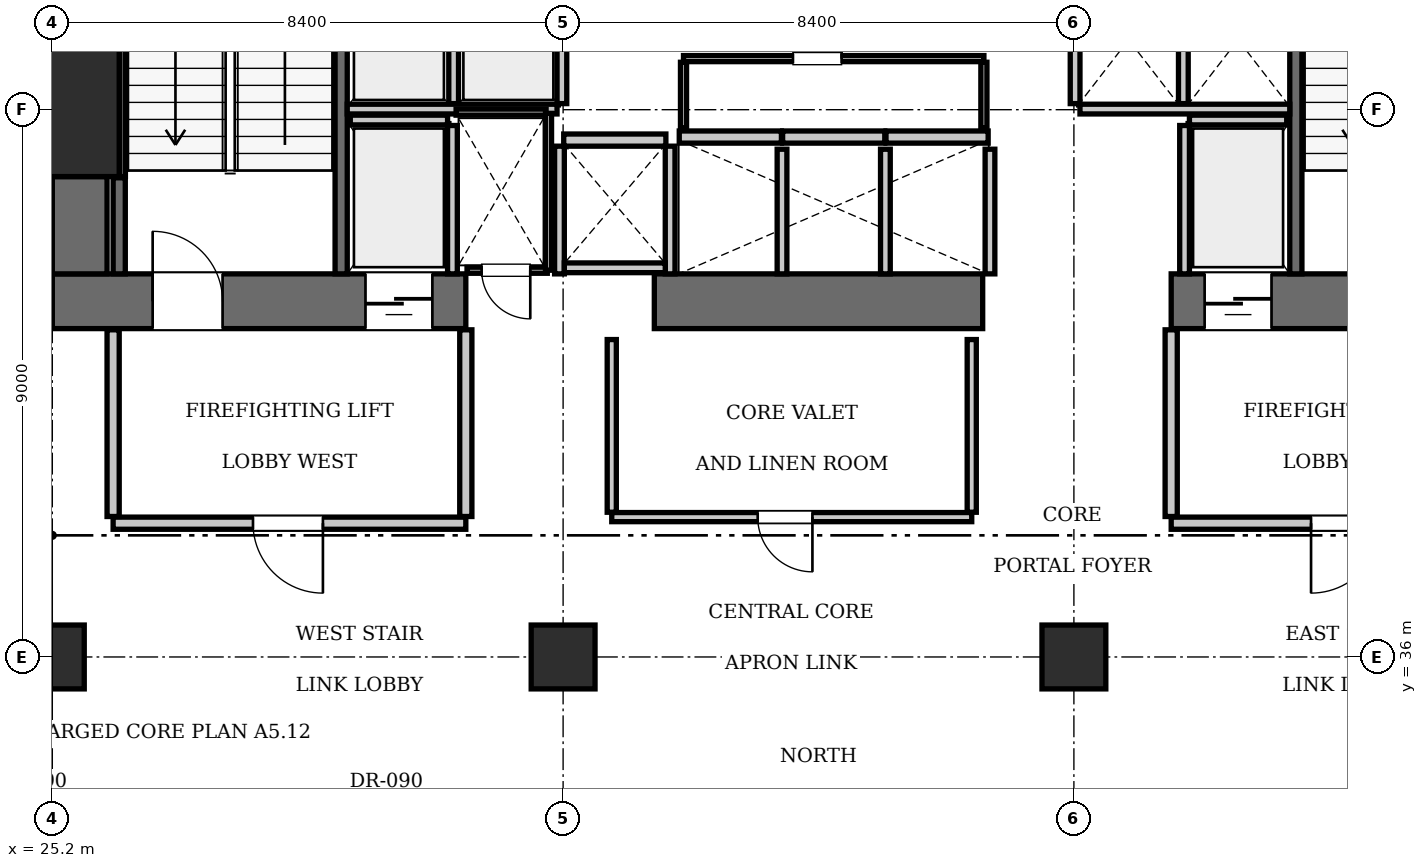
"""IFC4 building model, lengths in metres.
Left out: names, types, materials, properties, quantities, classifications, styles, units other than length and angle.
Written with IfcOpenShell. Run it as: python <this file> out.ifc"""

import sys

from ifc_helpers import new_model, si_unit, direction, frame, frame_2d, origin, origin_2d, place, context, subcontext, project, spatial, rectangle, extrude, element, fill, save


model = new_model("IFC4")
c1 = context("Model", 3, precision=1e-05, world=origin(), true_north=direction((0.0, 1.0)))
c2 = subcontext(c1, "Body", "Model", "MODEL_VIEW")
j1 = project(units=[si_unit("LENGTHUNIT", "METRE"), si_unit("PLANEANGLEUNIT", "RADIAN")], contexts=[c1])
p1 = place(None, origin())
s1 = spatial("IfcSite", under=j1, at=p1, CompositionType="ELEMENT")
p2 = place(p1, origin())
s2 = spatial("IfcBuilding", under=s1, at=p2, CompositionType="ELEMENT")
p3 = place(p2, frame((0.0, 0.0, 65.45)))
s3 = spatial("IfcBuildingStorey", under=s2, at=p3, CompositionType="ELEMENT", Elevation=65.45)
p4 = place(p3, frame((25.2, 45.0, 0.0), z_axis=(0.0, 0.0, 1.0), x_axis=(1.0, 0.0, 0.0)))
e1 = element("IfcColumn", 1, at=p4, inside=s3, PredefinedType="COLUMN", context=c2, shape_type="SweptSolid", body=[
    extrude(rectangle(XDim=2.2, YDim=2.2, at=origin_2d()), origin(), (0.0, 0.0, 1.0), 3.85),
])
p5 = place(p3, frame((25.2, 41.85, 0.0), z_axis=(0.0, 0.0, 1.0), x_axis=(1.0, 0.0, 0.0)))
e2 = element("IfcWall", 2, at=p5, inside=s3, PredefinedType="SHEAR", context=c2, shape_type="SweptSolid", body=[
    extrude(rectangle(XDim=6.8, YDim=0.9, at=frame_2d((3.4, 0.0))), origin(), (0.0, 0.0, 1.0), 3.85),
])
p6 = place(p5, frame((1.65, 0.0, 0.0)))
e3 = element("IfcOpeningElement", 3, at=p6, cuts=e2, PredefinedType="OPENING", context=c2, shape_type="SweptSolid", body=[
    extrude(rectangle(XDim=1.15, YDim=2.15, at=frame_2d((0.575, 1.075))), frame((0.0, 0.46, 0.0), z_axis=(0.0, -1.0, 0.0), x_axis=(1.0, 0.0, 0.0)), (0.0, 0.0, 1.0), 0.92),
])
p7 = place(p5, frame((5.15, 0.0, 0.0)))
e4 = element("IfcOpeningElement", 4, at=p7, cuts=e2, PredefinedType="OPENING", context=c2, shape_type="SweptSolid", body=[
    extrude(rectangle(XDim=1.1, YDim=2.2, at=frame_2d((0.55, 1.1))), frame((0.0, 0.46, 0.0), z_axis=(0.0, -1.0, 0.0), x_axis=(1.0, 0.0, 0.0)), (0.0, 0.0, 1.0), 0.92),
])
p8 = place(p3, frame((35.1, 41.85, 0.0), z_axis=(0.0, 0.0, 1.0), x_axis=(1.0, 0.0, 0.0)))
e5 = element("IfcWall", 5, at=p8, inside=s3, PredefinedType="SHEAR", context=c2, shape_type="SweptSolid", body=[
    extrude(rectangle(XDim=5.4, YDim=0.9, at=frame_2d((2.7, 0.0))), origin(), (0.0, 0.0, 1.0), 3.85),
])
p9 = place(p3, frame((43.6, 41.85, 0.0), z_axis=(0.0, 0.0, 1.0), x_axis=(1.0, 0.0, 0.0)))
e6 = element("IfcWall", 6, at=p9, inside=s3, PredefinedType="SHEAR", context=c2, shape_type="SweptSolid", body=[
    extrude(rectangle(XDim=6.8, YDim=0.9, at=frame_2d((3.4, 0.0))), origin(), (0.0, 0.0, 1.0), 3.85),
])
p10 = place(p9, frame((3.9, 0.0, 0.0)))
e7 = element("IfcOpeningElement", 7, at=p10, cuts=e6, PredefinedType="OPENING", context=c2, shape_type="SweptSolid", body=[
    extrude(rectangle(XDim=1.15, YDim=2.15, at=frame_2d((0.575, 1.075))), frame((0.0, 0.46, 0.0), z_axis=(0.0, -1.0, 0.0), x_axis=(1.0, 0.0, 0.0)), (0.0, 0.0, 1.0), 0.92),
])
p11 = place(p9, frame((0.55, 0.0, 0.0)))
e8 = element("IfcOpeningElement", 8, at=p11, cuts=e6, PredefinedType="OPENING", context=c2, shape_type="SweptSolid", body=[
    extrude(rectangle(XDim=1.1, YDim=2.2, at=frame_2d((0.55, 1.1))), frame((0.0, 0.46, 0.0), z_axis=(0.0, -1.0, 0.0), x_axis=(1.0, 0.0, 0.0)), (0.0, 0.0, 1.0), 0.92),
])
p12 = place(p3, frame((25.65, 42.3, 0.0), z_axis=(0.0, 0.0, 1.0), x_axis=(0.0, 1.0, 0.0)))
e9 = element("IfcWall", 9, at=p12, inside=s3, PredefinedType="SHEAR", context=c2, shape_type="SweptSolid", body=[
    extrude(rectangle(XDim=1.6, YDim=0.9, at=frame_2d((0.8, 0.0))), origin(), (0.0, 0.0, 1.0), 3.85),
])
for number, where, z_axis, x_axis in (
    (10, (25.2, 36.0, 0.0), (0.0, 0.0, 1.0), (1.0, 0.0, 0.0)),
    (11, (33.6, 36.0, 0.0), (0.0, 0.0, 1.0), (1.0, 0.0, 0.0)),
    (12, (42.0, 36.0, 0.0), (0.0, 0.0, 1.0), (1.0, 0.0, 0.0)),
):
    element("IfcColumn", number, at=place(p3, frame(where, z_axis=z_axis, x_axis=x_axis)), inside=s3, PredefinedType="COLUMN", context=c2, shape_type="SweptSolid", body=[
        extrude(rectangle(XDim=1.05, YDim=1.05, at=origin_2d()), origin(), (0.0, 0.0, 1.0), 3.85),
    ])
p13 = place(p3, frame((29.95, 42.3, 0.0), z_axis=(0.0, 0.0, 1.0), x_axis=(0.0, 1.0, 0.0)))
e13 = element("IfcWall", 13, at=p13, inside=s3, PredefinedType="SOLIDWALL", context=c2, shape_type="SweptSolid", body=[
    extrude(rectangle(XDim=8.85, YDim=0.2, at=frame_2d((4.425, 0.0))), origin(), (0.0, 0.0, 1.0), 3.61),
])
p14 = place(p3, frame((26.3, 42.3, 0.0), z_axis=(0.0, 0.0, 1.0), x_axis=(0.0, 1.0, 0.0)))
e14 = element("IfcWall", 14, at=p14, inside=s3, PredefinedType="SOLIDWALL", context=c2, shape_type="SweptSolid", body=[
    extrude(rectangle(XDim=1.58, YDim=0.2, at=frame_2d((0.79, 0.0))), origin(), (0.0, 0.0, 1.0), 3.61),
])
p15 = place(p3, frame((26.352, 43.9, 0.0), z_axis=(0.0, 0.0, 1.0), x_axis=(0.0, 1.0, 0.0)))
e15 = element("IfcWall", 15, at=p15, inside=s3, PredefinedType="SOLIDWALL", context=c2, shape_type="SweptSolid", body=[
    extrude(rectangle(XDim=2.2, YDim=0.1, at=frame_2d((1.1, 0.0))), origin(), (0.0, 0.0, 1.0), 3.61),
])
p16 = place(p3, frame((45.65, 42.3, 0.0), z_axis=(0.0, 0.0, 1.0), x_axis=(0.0, 1.0, 0.0)))
e16 = element("IfcWall", 16, at=p16, inside=s3, PredefinedType="SOLIDWALL", context=c2, shape_type="SweptSolid", body=[
    extrude(rectangle(XDim=8.85, YDim=0.2, at=frame_2d((4.425, 0.0))), origin(), (0.0, 0.0, 1.0), 3.61),
])
for number, where, z_axis, x_axis in (
    (17, (35.51, 44.55, 0.0), (0.0, 0.0, 1.0), (1.0, 0.0, 0.0)),
    (18, (37.21, 44.55, 0.0), (0.0, 0.0, 1.0), (1.0, 0.0, 0.0)),
):
    element("IfcWall", number, at=place(p3, frame(where, z_axis=z_axis, x_axis=x_axis)), inside=s3, PredefinedType="SOLIDWALL", context=c2, shape_type="SweptSolid", body=[
        extrude(rectangle(XDim=1.68, YDim=0.2, at=frame_2d((0.84, 0.0))), origin(), (0.0, 0.0, 1.0), 3.61),
    ])
p17 = place(p3, frame((38.91, 44.55, 0.0), z_axis=(0.0, 0.0, 1.0), x_axis=(1.0, 0.0, 0.0)))
e19 = element("IfcWall", 19, at=p17, inside=s3, PredefinedType="SOLIDWALL", context=c2, shape_type="SweptSolid", body=[
    extrude(rectangle(XDim=1.68, YDim=0.2, at=frame_2d((0.84, 0.0))), origin(), (0.0, 0.0, 1.0), 3.61),
])
p18 = place(p3, frame((33.61, 44.5, 0.0), z_axis=(0.0, 0.0, 1.0), x_axis=(1.0, 0.0, 0.0)))
e20 = element("IfcWall", 20, at=p18, inside=s3, PredefinedType="SOLIDWALL", context=c2, shape_type="SweptSolid", body=[
    extrude(rectangle(XDim=1.68, YDim=0.2, at=frame_2d((0.84, 0.0))), origin(), (0.0, 0.0, 1.0), 3.61),
])
p19 = place(p3, frame((30.1, 44.83, 0.0), z_axis=(0.0, 0.0, 1.0), x_axis=(1.0, 0.0, 0.0)))
e21 = element("IfcWall", 21, at=p19, inside=s3, PredefinedType="SOLIDWALL", context=c2, shape_type="SweptSolid", body=[
    extrude(rectangle(XDim=1.6, YDim=0.16, at=frame_2d((0.8, 0.0))), origin(), (0.0, 0.0, 1.0), 3.61),
])
p20 = place(p3, frame((31.78, 42.3, 0.0), z_axis=(0.0, 0.0, 1.0), x_axis=(0.0, 1.0, 0.0)))
e22 = element("IfcWall", 22, at=p20, inside=s3, PredefinedType="SOLIDWALL", context=c2, shape_type="SweptSolid", body=[
    extrude(rectangle(XDim=2.44, YDim=0.16, at=frame_2d((1.22, 0.0))), origin(), (0.0, 0.0, 1.0), 3.61),
])
p21 = place(p3, frame((43.9, 44.83, 0.0), z_axis=(0.0, 0.0, 1.0), x_axis=(1.0, 0.0, 0.0)))
e23 = element("IfcWall", 23, at=p21, inside=s3, PredefinedType="SOLIDWALL", context=c2, shape_type="SweptSolid", body=[
    extrude(rectangle(XDim=1.6, YDim=0.16, at=frame_2d((0.8, 0.0))), origin(), (0.0, 0.0, 1.0), 3.61),
])
p22 = place(p3, frame((43.82, 42.3, 0.0), z_axis=(0.0, 0.0, 1.0), x_axis=(0.0, 1.0, 0.0)))
e24 = element("IfcWall", 24, at=p22, inside=s3, PredefinedType="SOLIDWALL", context=c2, shape_type="SweptSolid", body=[
    extrude(rectangle(XDim=2.44, YDim=0.16, at=frame_2d((1.22, 0.0))), origin(), (0.0, 0.0, 1.0), 3.61),
])
for number, where, z_axis, x_axis in (
    (25, (31.8, 45.1, 0.0), (0.0, 0.0, 1.0), (0.0, 1.0, 0.0)),
    (26, (33.58, 45.1, 0.0), (0.0, 0.0, 1.0), (0.0, 1.0, 0.0)),
):
    element("IfcWall", number, at=place(p3, frame(where, z_axis=z_axis, x_axis=x_axis)), inside=s3, PredefinedType="SOLIDWALL", context=c2, shape_type="SweptSolid", body=[
        extrude(rectangle(XDim=1.95, YDim=0.16, at=frame_2d((0.975, 0.0))), origin(), (0.0, 0.0, 1.0), 3.61),
    ])
p23 = place(p3, frame((30.05, 45.01, 0.0), z_axis=(0.0, 0.0, 1.0), x_axis=(1.0, 0.0, 0.0)))
e27 = element("IfcWall", 27, at=p23, inside=s3, PredefinedType="SOLIDWALL", context=c2, shape_type="SweptSolid", body=[
    extrude(rectangle(XDim=3.45, YDim=0.16, at=frame_2d((1.725, 0.0))), origin(), (0.0, 0.0, 1.0), 3.61),
])
for number, where, z_axis, x_axis in (
    (28, (42.02, 45.1, 0.0), (0.0, 0.0, 1.0), (0.0, 1.0, 0.0)),
    (29, (43.8, 45.1, 0.0), (0.0, 0.0, 1.0), (0.0, 1.0, 0.0)),
):
    element("IfcWall", number, at=place(p3, frame(where, z_axis=z_axis, x_axis=x_axis)), inside=s3, PredefinedType="SOLIDWALL", context=c2, shape_type="SweptSolid", body=[
        extrude(rectangle(XDim=1.95, YDim=0.16, at=frame_2d((0.975, 0.0))), origin(), (0.0, 0.0, 1.0), 3.61),
    ])
p24 = place(p3, frame((42.1, 45.01, 0.0), z_axis=(0.0, 0.0, 1.0), x_axis=(1.0, 0.0, 0.0)))
e30 = element("IfcWall", 30, at=p24, inside=s3, PredefinedType="SOLIDWALL", context=c2, shape_type="SweptSolid", body=[
    extrude(rectangle(XDim=3.45, YDim=0.16, at=frame_2d((1.725, 0.0))), origin(), (0.0, 0.0, 1.0), 3.61),
])
for number, where, z_axis, x_axis in (
    (31, (37.2, 42.3, 0.0), (0.0, 0.0, 1.0), (0.0, 1.0, 0.0)),
    (32, (38.9, 42.3, 0.0), (0.0, 0.0, 1.0), (0.0, 1.0, 0.0)),
    (33, (40.62, 42.3, 0.0), (0.0, 0.0, 1.0), (0.0, 1.0, 0.0)),
):
    element("IfcWall", number, at=place(p3, frame(where, z_axis=z_axis, x_axis=x_axis)), inside=s3, PredefinedType="SOLIDWALL", context=c2, shape_type="SweptSolid", body=[
        extrude(rectangle(XDim=2.05, YDim=0.16, at=frame_2d((1.025, 0.0))), origin(), (0.0, 0.0, 1.0), 3.61),
    ])
for number, where, z_axis, x_axis in (
    (34, (33.54, 42.3, 0.0), (0.0, 0.0, 1.0), (0.0, 1.0, 0.0)),
    (35, (35.36, 42.3, 0.0), (0.0, 0.0, 1.0), (0.0, 1.0, 0.0)),
):
    element("IfcWall", number, at=place(p3, frame(where, z_axis=z_axis, x_axis=x_axis)), inside=s3, PredefinedType="SOLIDWALL", context=c2, shape_type="SweptSolid", body=[
        extrude(rectangle(XDim=2.1, YDim=0.16, at=frame_2d((1.05, 0.0))), origin(), (0.0, 0.0, 1.0), 3.61),
    ])
p25 = place(p3, frame((33.62, 42.4, 0.0), z_axis=(0.0, 0.0, 1.0), x_axis=(1.0, 0.0, 0.0)))
e36 = element("IfcWall", 36, at=p25, inside=s3, PredefinedType="SOLIDWALL", context=c2, shape_type="SweptSolid", body=[
    extrude(rectangle(XDim=1.66, YDim=0.16, at=frame_2d((0.83, 0.0))), origin(), (0.0, 0.0, 1.0), 3.61),
])
p26 = place(p3, frame((26.2, 38.2, 0.0), z_axis=(0.0, 0.0, 1.0), x_axis=(1.0, 0.0, 0.0)))
e37 = element("IfcWall", 37, at=p26, inside=s3, PredefinedType="PARTITIONING", context=c2, shape_type="SweptSolid", body=[
    extrude(rectangle(XDim=5.8, YDim=0.2, at=frame_2d((2.9, 0.0))), origin(), (0.0, 0.0, 1.0), 3.61),
])
p27 = place(p26, frame((2.3, 0.0, 0.0)))
e38 = element("IfcOpeningElement", 38, at=p27, cuts=e37, PredefinedType="OPENING", context=c2, shape_type="SweptSolid", body=[
    extrude(rectangle(XDim=1.15, YDim=2.15, at=frame_2d((0.575, 1.075))), frame((0.0, 0.11, 0.0), z_axis=(0.0, -1.0, 0.0), x_axis=(1.0, 0.0, 0.0)), (0.0, 0.0, 1.0), 0.22),
])
for number, where, z_axis, x_axis in (
    (39, (26.2, 38.31, 0.0), (0.0, 0.0, 1.0), (0.0, 1.0, 0.0)),
    (40, (32.0, 38.31, 0.0), (0.0, 0.0, 1.0), (0.0, 1.0, 0.0)),
):
    element("IfcWall", number, at=place(p3, frame(where, z_axis=z_axis, x_axis=x_axis)), inside=s3, PredefinedType="PARTITIONING", context=c2, shape_type="SweptSolid", body=[
        extrude(rectangle(XDim=3.07, YDim=0.2, at=frame_2d((1.535, 0.0))), origin(), (0.0, 0.0, 1.0), 3.61),
    ])
p28 = place(p3, frame((43.6, 38.2, 0.0), z_axis=(0.0, 0.0, 1.0), x_axis=(1.0, 0.0, 0.0)))
e41 = element("IfcWall", 41, at=p28, inside=s3, PredefinedType="PARTITIONING", context=c2, shape_type="SweptSolid", body=[
    extrude(rectangle(XDim=5.8, YDim=0.2, at=frame_2d((2.9, 0.0))), origin(), (0.0, 0.0, 1.0), 3.61),
])
p29 = place(p28, frame((2.3, 0.0, 0.0)))
e42 = element("IfcOpeningElement", 42, at=p29, cuts=e41, PredefinedType="OPENING", context=c2, shape_type="SweptSolid", body=[
    extrude(rectangle(XDim=1.15, YDim=2.15, at=frame_2d((0.575, 1.075))), frame((0.0, 0.11, 0.0), z_axis=(0.0, -1.0, 0.0), x_axis=(1.0, 0.0, 0.0)), (0.0, 0.0, 1.0), 0.22),
])
p30 = place(p3, frame((43.6, 38.31, 0.0), z_axis=(0.0, 0.0, 1.0), x_axis=(0.0, 1.0, 0.0)))
e43 = element("IfcWall", 43, at=p30, inside=s3, PredefinedType="PARTITIONING", context=c2, shape_type="SweptSolid", body=[
    extrude(rectangle(XDim=3.07, YDim=0.2, at=frame_2d((1.535, 0.0))), origin(), (0.0, 0.0, 1.0), 3.61),
])
p31 = place(p3, frame((32.02, 42.36, 0.0), z_axis=(0.0, 0.0, 1.0), x_axis=(1.0, 0.0, 0.0)))
e44 = element("IfcWall", 44, at=p31, inside=s3, PredefinedType="PARTITIONING", context=c2, shape_type="SweptSolid", body=[
    extrude(rectangle(XDim=1.32, YDim=0.1, at=frame_2d((0.66, 0.0))), origin(), (0.0, 0.0, 1.0), 3.61),
])
p32 = place(p31, frame((0.24, 0.0, 0.0)))
e45 = element("IfcOpeningElement", 45, at=p32, cuts=e44, PredefinedType="OPENING", context=c2, shape_type="SweptSolid", body=[
    extrude(rectangle(XDim=0.8, YDim=2.05, at=frame_2d((0.4, 1.025))), frame((0.0, 0.06, 0.0), z_axis=(0.0, -1.0, 0.0), x_axis=(1.0, 0.0, 0.0)), (0.0, 0.0, 1.0), 0.12),
])
p33 = place(p3, frame((31.84, 44.96, 0.0), z_axis=(0.0, 0.0, 1.0), x_axis=(1.0, 0.0, 0.0)))
e46 = element("IfcWall", 46, at=p33, inside=s3, PredefinedType="PARTITIONING", context=c2, shape_type="SweptSolid", body=[
    extrude(rectangle(XDim=1.48, YDim=0.1, at=frame_2d((0.74, 0.0))), origin(), (0.0, 0.0, 1.0), 3.61),
])
p34 = place(p3, frame((33.36, 42.36, 0.0), z_axis=(0.0, 0.0, 1.0), x_axis=(0.0, 1.0, 0.0)))
e47 = element("IfcWall", 47, at=p34, inside=s3, PredefinedType="PARTITIONING", context=c2, shape_type="SweptSolid", body=[
    extrude(rectangle(XDim=2.58, YDim=0.1, at=frame_2d((1.29, 0.0))), origin(), (0.0, 0.0, 1.0), 3.61),
])
p35 = place(p3, frame((35.58, 45.84, 0.0), z_axis=(0.0, 0.0, 1.0), x_axis=(1.0, 0.0, 0.0)))
e48 = element("IfcWall", 48, at=p35, inside=s3, PredefinedType="PARTITIONING", context=c2, shape_type="SweptSolid", body=[
    extrude(rectangle(XDim=4.94, YDim=0.1, at=frame_2d((2.47, 0.0))), origin(), (0.0, 0.0, 1.0), 3.61),
])
p36 = place(p35, frame((1.8, 0.0, 0.0)))
e49 = element("IfcOpeningElement", 49, at=p36, cuts=e48, PredefinedType="OPENING", context=c2, shape_type="SweptSolid", body=[
    extrude(rectangle(XDim=0.8, YDim=2.05, at=frame_2d((0.4, 1.025))), frame((0.0, 0.06, 0.0), z_axis=(0.0, -1.0, 0.0), x_axis=(1.0, 0.0, 0.0)), (0.0, 0.0, 1.0), 0.12),
])
for number, where, z_axis, x_axis in (
    (50, (35.58, 44.7, 0.0), (0.0, 0.0, 1.0), (0.0, 1.0, 0.0)),
    (51, (40.52, 44.7, 0.0), (0.0, 0.0, 1.0), (0.0, 1.0, 0.0)),
):
    element("IfcWall", number, at=place(p3, frame(where, z_axis=z_axis, x_axis=x_axis)), inside=s3, PredefinedType="PARTITIONING", context=c2, shape_type="SweptSolid", body=[
        extrude(rectangle(XDim=1.08, YDim=0.1, at=frame_2d((0.54, 0.0))), origin(), (0.0, 0.0, 1.0), 3.61),
    ])
p37 = place(p3, frame((34.4, 38.3, 0.0), z_axis=(0.0, 0.0, 1.0), x_axis=(1.0, 0.0, 0.0)))
e52 = element("IfcWall", 52, at=p37, inside=s3, PredefinedType="PARTITIONING", context=c2, shape_type="SweptSolid", body=[
    extrude(rectangle(XDim=5.92, YDim=0.15, at=frame_2d((2.96, 0.0))), origin(), (0.0, 0.0, 1.0), 3.61),
])
p38 = place(p37, frame((2.4, 0.0, 0.0)))
e53 = element("IfcOpeningElement", 53, at=p38, cuts=e52, PredefinedType="OPENING", context=c2, shape_type="SweptSolid", body=[
    extrude(rectangle(XDim=0.9, YDim=2.1, at=frame_2d((0.45, 1.05))), frame((0.0, 0.085, 0.0), z_axis=(0.0, -1.0, 0.0), x_axis=(1.0, 0.0, 0.0)), (0.0, 0.0, 1.0), 0.17),
])
for number, where, z_axis, x_axis in (
    (54, (34.4, 38.38, 0.0), (0.0, 0.0, 1.0), (0.0, 1.0, 0.0)),
    (55, (40.32, 38.38, 0.0), (0.0, 0.0, 1.0), (0.0, 1.0, 0.0)),
):
    element("IfcWall", number, at=place(p3, frame(where, z_axis=z_axis, x_axis=x_axis)), inside=s3, PredefinedType="PARTITIONING", context=c2, shape_type="SweptSolid", body=[
        extrude(rectangle(XDim=2.84, YDim=0.15, at=frame_2d((1.42, 0.0))), origin(), (0.0, 0.0, 1.0), 3.61),
    ])
p39 = place(p6, origin())
e56 = element("IfcDoor", 56, at=p39, inside=s3, OperationType="SINGLE_SWING_LEFT", PredefinedType="DOOR", context=c2, shape_type="SweptSolid", body=[
    extrude(rectangle(XDim=1.15, YDim=2.15, at=frame_2d((0.575, 1.075))), frame((0.0, 0.025, 0.0), z_axis=(0.0, -1.0, 0.0), x_axis=(1.0, 0.0, 0.0)), (0.0, 0.0, 1.0), 0.05),
])
fill(e3, e56)
p40 = place(p7, frame((1.1, 0.0, 0.0), z_axis=(0.0, 0.0, 1.0), x_axis=(-1.0, 0.0, 0.0)))
e57 = element("IfcDoor", 57, at=p40, inside=s3, OperationType="SLIDING_TO_LEFT", PredefinedType="DOOR", context=c2, shape_type="SweptSolid", body=[
    extrude(rectangle(XDim=1.1, YDim=2.2, at=frame_2d((0.55, 1.1))), frame((0.0, 0.025, 0.0), z_axis=(0.0, -1.0, 0.0), x_axis=(1.0, 0.0, 0.0)), (0.0, 0.0, 1.0), 0.05),
])
fill(e4, e57)
p41 = place(p11, frame((1.1, 0.0, 0.0), z_axis=(0.0, 0.0, 1.0), x_axis=(-1.0, 0.0, 0.0)))
e58 = element("IfcDoor", 58, at=p41, inside=s3, OperationType="SLIDING_TO_LEFT", PredefinedType="DOOR", context=c2, shape_type="SweptSolid", body=[
    extrude(rectangle(XDim=1.1, YDim=2.2, at=frame_2d((0.55, 1.1))), frame((0.0, 0.025, 0.0), z_axis=(0.0, -1.0, 0.0), x_axis=(1.0, 0.0, 0.0)), (0.0, 0.0, 1.0), 0.05),
])
fill(e8, e58)
p42 = place(p27, frame((1.15, 0.0, 0.0), z_axis=(0.0, 0.0, 1.0), x_axis=(-1.0, 0.0, 0.0)))
e59 = element("IfcDoor", 59, at=p42, inside=s3, OperationType="SINGLE_SWING_LEFT", PredefinedType="DOOR", context=c2, shape_type="SweptSolid", body=[
    extrude(rectangle(XDim=1.15, YDim=2.15, at=frame_2d((0.575, 1.075))), frame((0.0, 0.025, 0.0), z_axis=(0.0, -1.0, 0.0), x_axis=(1.0, 0.0, 0.0)), (0.0, 0.0, 1.0), 0.05),
])
fill(e38, e59)
p43 = place(p29, frame((1.15, 0.0, 0.0), z_axis=(0.0, 0.0, 1.0), x_axis=(-1.0, 0.0, 0.0)))
e60 = element("IfcDoor", 60, at=p43, inside=s3, OperationType="SINGLE_SWING_RIGHT", PredefinedType="DOOR", context=c2, shape_type="SweptSolid", body=[
    extrude(rectangle(XDim=1.15, YDim=2.15, at=frame_2d((0.575, 1.075))), frame((0.0, 0.025, 0.0), z_axis=(0.0, -1.0, 0.0), x_axis=(1.0, 0.0, 0.0)), (0.0, 0.0, 1.0), 0.05),
])
fill(e42, e60)
p44 = place(p32, frame((0.8, 0.0, 0.0), z_axis=(0.0, 0.0, 1.0), x_axis=(-1.0, 0.0, 0.0)))
e61 = element("IfcDoor", 61, at=p44, inside=s3, OperationType="SINGLE_SWING_LEFT", PredefinedType="DOOR", context=c2, shape_type="SweptSolid", body=[
    extrude(rectangle(XDim=0.8, YDim=2.05, at=frame_2d((0.4, 1.025))), frame((0.0, 0.025, 0.0), z_axis=(0.0, -1.0, 0.0), x_axis=(1.0, 0.0, 0.0)), (0.0, 0.0, 1.0), 0.05),
])
fill(e45, e61)
p45 = place(p36, origin())
e62 = element("IfcDoor", 62, at=p45, inside=s3, OperationType="SINGLE_SWING_RIGHT", PredefinedType="DOOR", context=c2, shape_type="SweptSolid", body=[
    extrude(rectangle(XDim=0.8, YDim=2.05, at=frame_2d((0.4, 1.025))), frame((0.0, 0.025, 0.0), z_axis=(0.0, -1.0, 0.0), x_axis=(1.0, 0.0, 0.0)), (0.0, 0.0, 1.0), 0.05),
])
fill(e49, e62)
p46 = place(p38, frame((0.9, 0.0, 0.0), z_axis=(0.0, 0.0, 1.0), x_axis=(-1.0, 0.0, 0.0)))
e63 = element("IfcDoor", 63, at=p46, inside=s3, OperationType="SINGLE_SWING_LEFT", PredefinedType="DOOR", context=c2, shape_type="SweptSolid", body=[
    extrude(rectangle(XDim=0.9, YDim=2.1, at=frame_2d((0.45, 1.05))), frame((0.0, 0.025, 0.0), z_axis=(0.0, -1.0, 0.0), x_axis=(1.0, 0.0, 0.0)), (0.0, 0.0, 1.0), 0.05),
])
fill(e53, e63)
save(model, sys.argv[1])
